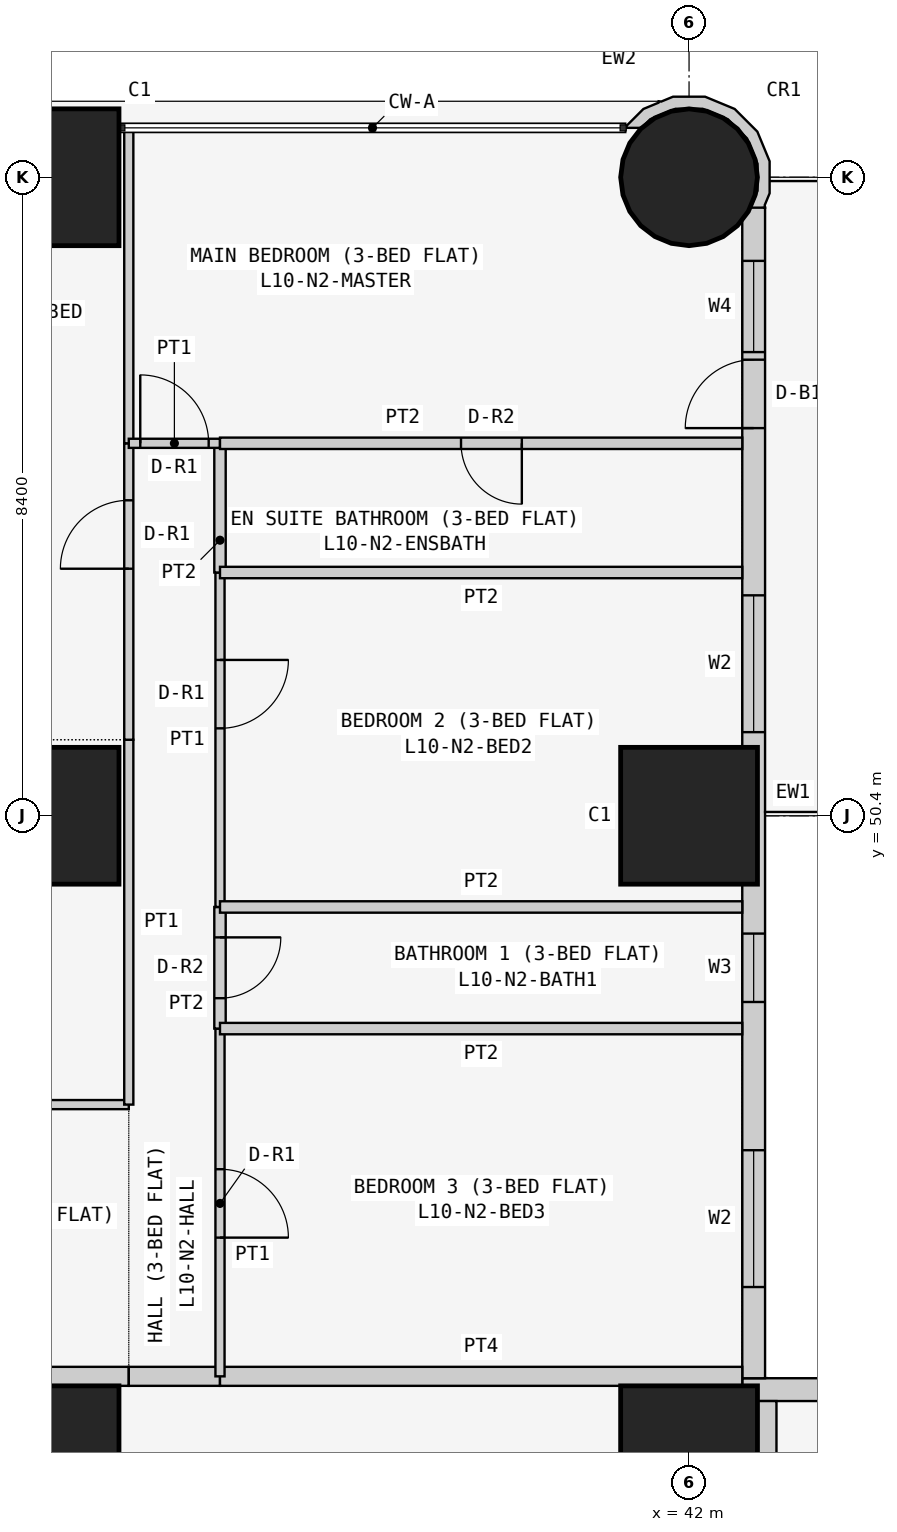
"""IFC4 building model, lengths in metres.
Left out: names, types, materials, properties, quantities, classifications, styles, units other than length and angle.
Written with IfcOpenShell. Run it as: python <this file> out.ifc"""

import sys

from ifc_helpers import new_model, si_unit, direction, frame, frame_2d, origin, origin_2d, place, context, subcontext, project, spatial, polyline, rectangle, circle, outline, extrude, element, fill, save


model = new_model("IFC4")
c1 = context("Model", 3, precision=1e-05, world=origin(), true_north=direction((0.0, 1.0)))
c2 = subcontext(c1, "Body", "Model", "MODEL_VIEW")
j1 = project(units=[si_unit("LENGTHUNIT", "METRE"), si_unit("PLANEANGLEUNIT", "RADIAN")], contexts=[c1])
p1 = place(None, origin())
s1 = spatial("IfcSite", under=j1, at=p1, CompositionType="ELEMENT")
p2 = place(p1, origin())
s2 = spatial("IfcBuilding", under=s1, at=p2, CompositionType="ELEMENT")
p3 = place(p2, frame((0.0, 0.0, 45.3)))
s3 = spatial("IfcBuildingStorey", under=s2, at=p3, CompositionType="ELEMENT", Elevation=45.3)
for number, where, z_axis, x_axis in (
    (1, (33.6, 42.0, 0.0), (0.0, 0.0, 1.0), (1.0, 0.0, 0.0)),
    (2, (33.6, 50.4, 0.0), (0.0, 0.0, 1.0), (1.0, 0.0, 0.0)),
    (3, (33.6, 58.8, 0.0), (0.0, 0.0, 1.0), (1.0, 0.0, 0.0)),
    (4, (42.0, 42.0, 0.0), (0.0, 0.0, 1.0), (1.0, 0.0, 0.0)),
    (5, (42.0, 50.4, 0.0), (0.0, 0.0, 1.0), (1.0, 0.0, 0.0)),
):
    element("IfcColumn", number, at=place(p3, frame(where, z_axis=z_axis, x_axis=x_axis)), inside=s3, PredefinedType="COLUMN", context=c2, shape_type="SweptSolid", body=[
        extrude(rectangle(XDim=1.8, YDim=1.8, at=origin_2d()), origin(), (0.0, 0.0, 1.0), 3.6),
    ])
p4 = place(p3, frame((42.0, 58.8, 0.0), z_axis=(0.0, 0.0, 1.0), x_axis=(1.0, 0.0, 0.0)))
e6 = element("IfcColumn", 6, at=p4, inside=s3, PredefinedType="COLUMN", context=c2, shape_type="SweptSolid", body=[
    extrude(circle(Radius=0.9, at=origin_2d()), origin(), (0.0, 0.0, 1.0), 3.6),
])
p5 = place(p3, frame((58.4, 42.85, 0.0), z_axis=(0.0, 0.0, 1.0), x_axis=(-1.0, 0.0, 0.0)))
e7 = element("IfcWall", 7, at=p5, inside=s3, PredefinedType="SOLIDWALL", context=c2, shape_type="SweptSolid", body=[
    extrude(rectangle(XDim=15.7, YDim=0.3, at=frame_2d((7.85, 0.0))), origin(), (0.0, 0.0, 1.0), 3.45),
])
p6 = place(p5, frame((12.4, 0.0, 0.9)))
e8 = element("IfcOpeningElement", 8, at=p6, cuts=e7, PredefinedType="OPENING", context=c2, shape_type="SweptSolid", body=[
    extrude(rectangle(XDim=1.8, YDim=1.5, at=frame_2d((0.9, 0.75))), frame((0.0, 0.16, 0.0), z_axis=(0.0, -1.0, 0.0), x_axis=(1.0, 0.0, 0.0)), (0.0, 0.0, 1.0), 0.32),
])
p7 = place(p5, frame((9.55, 0.0, 1.5)))
e9 = element("IfcOpeningElement", 9, at=p7, cuts=e7, PredefinedType="OPENING", context=c2, shape_type="SweptSolid", body=[
    extrude(rectangle(XDim=0.9, YDim=0.7, at=frame_2d((0.45, 0.35))), frame((0.0, 0.16, 0.0), z_axis=(0.0, -1.0, 0.0), x_axis=(1.0, 0.0, 0.0)), (0.0, 0.0, 1.0), 0.32),
])
p8 = place(p5, frame((5.1, 0.0, 0.9)))
e10 = element("IfcOpeningElement", 10, at=p8, cuts=e7, PredefinedType="OPENING", context=c2, shape_type="SweptSolid", body=[
    extrude(rectangle(XDim=1.8, YDim=1.5, at=frame_2d((0.9, 0.75))), frame((0.0, 0.16, 0.0), z_axis=(0.0, -1.0, 0.0), x_axis=(1.0, 0.0, 0.0)), (0.0, 0.0, 1.0), 0.32),
])
p9 = place(p5, frame((2.0, 0.0, 0.0)))
e11 = element("IfcOpeningElement", 11, at=p9, cuts=e7, PredefinedType="OPENING", context=c2, shape_type="SweptSolid", body=[
    extrude(rectangle(XDim=0.9, YDim=2.4, at=frame_2d((0.45, 1.2))), frame((0.0, 0.16, 0.0), z_axis=(0.0, -1.0, 0.0), x_axis=(1.0, 0.0, 0.0)), (0.0, 0.0, 1.0), 0.32),
])
p10 = place(p5, frame((0.7, 0.0, 0.9)))
e12 = element("IfcOpeningElement", 12, at=p10, cuts=e7, PredefinedType="OPENING", context=c2, shape_type="SweptSolid", body=[
    extrude(rectangle(XDim=1.2, YDim=1.5, at=frame_2d((0.6, 0.75))), frame((0.0, 0.16, 0.0), z_axis=(0.0, -1.0, 0.0), x_axis=(1.0, 0.0, 0.0)), (0.0, 0.0, 1.0), 0.32),
])
p11 = place(p3, frame((42.85, 43.0, 0.0), z_axis=(0.0, 0.0, 1.0), x_axis=(0.0, 1.0, 0.0)))
e13 = element("IfcWall", 13, at=p11, inside=s3, PredefinedType="SOLIDWALL", context=c2, shape_type="SweptSolid", body=[
    extrude(rectangle(XDim=15.4, YDim=0.3, at=frame_2d((7.7, 0.0))), origin(), (0.0, 0.0, 1.0), 3.45),
])
p12 = place(p11, frame((1.2, 0.0, 0.9)))
e14 = element("IfcOpeningElement", 14, at=p12, cuts=e13, PredefinedType="OPENING", context=c2, shape_type="SweptSolid", body=[
    extrude(rectangle(XDim=1.8, YDim=1.5, at=frame_2d((0.9, 0.75))), frame((0.0, 0.16, 0.0), z_axis=(0.0, -1.0, 0.0), x_axis=(1.0, 0.0, 0.0)), (0.0, 0.0, 1.0), 0.32),
])
p13 = place(p11, frame((4.95, 0.0, 1.5)))
e15 = element("IfcOpeningElement", 15, at=p13, cuts=e13, PredefinedType="OPENING", context=c2, shape_type="SweptSolid", body=[
    extrude(rectangle(XDim=0.9, YDim=0.7, at=frame_2d((0.45, 0.35))), frame((0.0, 0.16, 0.0), z_axis=(0.0, -1.0, 0.0), x_axis=(1.0, 0.0, 0.0)), (0.0, 0.0, 1.0), 0.32),
])
p14 = place(p11, frame((8.5, 0.0, 0.9)))
e16 = element("IfcOpeningElement", 16, at=p14, cuts=e13, PredefinedType="OPENING", context=c2, shape_type="SweptSolid", body=[
    extrude(rectangle(XDim=1.8, YDim=1.5, at=frame_2d((0.9, 0.75))), frame((0.0, 0.16, 0.0), z_axis=(0.0, -1.0, 0.0), x_axis=(1.0, 0.0, 0.0)), (0.0, 0.0, 1.0), 0.32),
])
p15 = place(p11, frame((12.5, 0.0, 0.0)))
e17 = element("IfcOpeningElement", 17, at=p15, cuts=e13, PredefinedType="OPENING", context=c2, shape_type="SweptSolid", body=[
    extrude(rectangle(XDim=0.9, YDim=2.4, at=frame_2d((0.45, 1.2))), frame((0.0, 0.16, 0.0), z_axis=(0.0, -1.0, 0.0), x_axis=(1.0, 0.0, 0.0)), (0.0, 0.0, 1.0), 0.32),
])
p16 = place(p11, frame((13.5, 0.0, 0.9)))
e18 = element("IfcOpeningElement", 18, at=p16, cuts=e13, PredefinedType="OPENING", context=c2, shape_type="SweptSolid", body=[
    extrude(rectangle(XDim=1.2, YDim=1.5, at=frame_2d((0.6, 0.75))), frame((0.0, 0.16, 0.0), z_axis=(0.0, -1.0, 0.0), x_axis=(1.0, 0.0, 0.0)), (0.0, 0.0, 1.0), 0.32),
])
p17 = place(p3, frame((42.91, 58.436, 0.0), z_axis=(0.0, 0.0, 1.0), x_axis=(0.377204953059, 0.926129809145, 0.0)))
e19 = element("IfcWall", 19, at=p17, inside=s3, PredefinedType="SOLIDWALL", context=c2, shape_type="SweptSolid", body=[
    extrude(outline(polyline([(0.769, 1.728), (0.75, 1.723), (0.6, 1.875), (0.295, 2.004), (0.281, 1.998), (0.36, 1.803), (0.509, 1.741), (0.761, 1.486), (0.896, 1.154), (0.894, 0.795), (0.755, 0.465), (0.5, 0.213), (0.168, 0.078), (-0.1, 0.08), (0.001, -0.097), (0.03, -0.08), (0.198, -0.081), (0.589, 0.078), (0.889, 0.374), (1.052, 0.763), (1.055, 1.185), (0.896, 1.575), (0.778, 1.695), (0.769, 1.728)])), origin(), (0.0, 0.0, 1.0), 3.45),
])
p18 = place(p3, frame((29.4, 43.025, 0.0), z_axis=(0.0, 0.0, 1.0), x_axis=(1.0, 0.0, 0.0)))
e20 = element("IfcWall", 20, at=p18, inside=s3, PredefinedType="PARTITIONING", context=c2, shape_type="SweptSolid", body=[
    extrude(rectangle(XDim=5.229, YDim=0.25, at=frame_2d((2.615, 0.0))), origin(), (0.0, 0.0, 1.0), 3.45),
])
p19 = place(p18, frame((2.1, 0.0, 0.0)))
e21 = element("IfcOpeningElement", 21, at=p19, cuts=e20, PredefinedType="OPENING", context=c2, shape_type="SweptSolid", body=[
    extrude(rectangle(XDim=1.0, YDim=2.1, at=frame_2d((0.5, 1.05))), frame((0.0, 0.135, 0.0), z_axis=(0.0, -1.0, 0.0), x_axis=(1.0, 0.0, 0.0)), (0.0, 0.0, 1.0), 0.27),
])
p20 = place(p3, frame((34.629, 43.025, 0.0), z_axis=(0.0, 0.0, 1.0), x_axis=(1.0, 0.0, 0.0)))
e22 = element("IfcWall", 22, at=p20, inside=s3, PredefinedType="PARTITIONING", context=c2, shape_type="SweptSolid", body=[
    extrude(rectangle(XDim=1.2, YDim=0.25, at=frame_2d((0.6, 0.0))), origin(), (0.0, 0.0, 1.0), 3.45),
])
for number, where, z_axis, x_axis in (
    (23, (35.829, 43.025, 0.0), (0.0, 0.0, 1.0), (1.0, 0.0, 0.0)),
    (24, (43.025, 42.7, 0.0), (0.0, 0.0, 1.0), (0.0, -1.0, 0.0)),
):
    element("IfcWall", number, at=place(p3, frame(where, z_axis=z_axis, x_axis=x_axis)), inside=s3, PredefinedType="PARTITIONING", context=c2, shape_type="SweptSolid", body=[
        extrude(rectangle(XDim=6.871, YDim=0.25, at=frame_2d((3.436, 0.0))), origin(), (0.0, 0.0, 1.0), 3.45),
    ])
p21 = place(p3, frame((29.4, 46.6, 0.0), z_axis=(0.0, 0.0, 1.0), x_axis=(1.0, 0.0, 0.0)))
e25 = element("IfcWall", 25, at=p21, inside=s3, PredefinedType="PARTITIONING", context=c2, shape_type="SweptSolid", body=[
    extrude(rectangle(XDim=5.229, YDim=0.12, at=frame_2d((2.615, 0.0))), origin(), (0.0, 0.0, 1.0), 3.45),
])
p22 = place(p21, frame((1.05, 0.0, 0.0)))
e26 = element("IfcOpeningElement", 26, at=p22, cuts=e25, PredefinedType="OPENING", context=c2, shape_type="SweptSolid", body=[
    extrude(rectangle(XDim=0.9, YDim=2.1, at=frame_2d((0.45, 1.05))), frame((0.0, 0.07, 0.0), z_axis=(0.0, -1.0, 0.0), x_axis=(1.0, 0.0, 0.0)), (0.0, 0.0, 1.0), 0.14),
])
p23 = place(p3, frame((34.629, 51.4, 0.0), z_axis=(0.0, 0.0, 1.0), x_axis=(0.0, -1.0, 0.0)))
e27 = element("IfcWall", 27, at=p23, inside=s3, PredefinedType="PARTITIONING", context=c2, shape_type="SweptSolid", body=[
    extrude(rectangle(XDim=4.8, YDim=0.12, at=frame_2d((2.4, 0.0))), origin(), (0.0, 0.0, 1.0), 3.45),
])
p24 = place(p3, frame((34.629, 55.3, 0.0), z_axis=(0.0, 0.0, 1.0), x_axis=(0.0, -1.0, 0.0)))
e28 = element("IfcWall", 28, at=p24, inside=s3, PredefinedType="PARTITIONING", context=c2, shape_type="SweptSolid", body=[
    extrude(rectangle(XDim=3.9, YDim=0.12, at=frame_2d((1.95, 0.0))), origin(), (0.0, 0.0, 1.0), 3.45),
])
p25 = place(p24, frame((0.75, 0.0, 0.0)))
e29 = element("IfcOpeningElement", 29, at=p25, cuts=e28, PredefinedType="OPENING", context=c2, shape_type="SweptSolid", body=[
    extrude(rectangle(XDim=0.9, YDim=2.1, at=frame_2d((0.45, 1.05))), frame((0.0, 0.07, 0.0), z_axis=(0.0, -1.0, 0.0), x_axis=(1.0, 0.0, 0.0)), (0.0, 0.0, 1.0), 0.14),
])
p26 = place(p3, frame((34.629, 59.45, 0.0), z_axis=(0.0, 0.0, 1.0), x_axis=(0.0, -1.0, 0.0)))
e30 = element("IfcWall", 30, at=p26, inside=s3, PredefinedType="PARTITIONING", context=c2, shape_type="SweptSolid", body=[
    extrude(rectangle(XDim=4.15, YDim=0.12, at=frame_2d((2.075, 0.0))), origin(), (0.0, 0.0, 1.0), 3.45),
])
p27 = place(p3, frame((35.829, 47.6, 0.0), z_axis=(0.0, 0.0, 1.0), x_axis=(0.0, -1.0, 0.0)))
e31 = element("IfcWall", 31, at=p27, inside=s3, PredefinedType="PARTITIONING", context=c2, shape_type="SweptSolid", body=[
    extrude(rectangle(XDim=4.575, YDim=0.12, at=frame_2d((2.288, 0.0))), origin(), (0.0, 0.0, 1.0), 3.45),
])
p28 = place(p27, frame((1.85, 0.0, 0.0)))
e32 = element("IfcOpeningElement", 32, at=p28, cuts=e31, PredefinedType="OPENING", context=c2, shape_type="SweptSolid", body=[
    extrude(rectangle(XDim=0.9, YDim=2.1, at=frame_2d((0.45, 1.05))), frame((0.0, 0.07, 0.0), z_axis=(0.0, -1.0, 0.0), x_axis=(1.0, 0.0, 0.0)), (0.0, 0.0, 1.0), 0.14),
])
p29 = place(p3, frame((35.829, 49.2, 0.0), z_axis=(0.0, 0.0, 1.0), x_axis=(0.0, -1.0, 0.0)))
e33 = element("IfcWall", 33, at=p29, inside=s3, PredefinedType="PARTITIONING", context=c2, shape_type="SweptSolid", body=[
    extrude(rectangle(XDim=1.6, YDim=0.15, at=frame_2d((0.8, 0.0))), origin(), (0.0, 0.0, 1.0), 3.45),
])
p30 = place(p29, frame((0.4, 0.0, 0.0)))
e34 = element("IfcOpeningElement", 34, at=p30, cuts=e33, PredefinedType="OPENING", context=c2, shape_type="SweptSolid", body=[
    extrude(rectangle(XDim=0.8, YDim=2.1, at=frame_2d((0.4, 1.05))), frame((0.0, 0.085, 0.0), z_axis=(0.0, -1.0, 0.0), x_axis=(1.0, 0.0, 0.0)), (0.0, 0.0, 1.0), 0.17),
])
p31 = place(p3, frame((35.829, 53.6, 0.0), z_axis=(0.0, 0.0, 1.0), x_axis=(0.0, -1.0, 0.0)))
e35 = element("IfcWall", 35, at=p31, inside=s3, PredefinedType="PARTITIONING", context=c2, shape_type="SweptSolid", body=[
    extrude(rectangle(XDim=4.4, YDim=0.12, at=frame_2d((2.2, 0.0))), origin(), (0.0, 0.0, 1.0), 3.45),
])
p32 = place(p31, frame((1.15, 0.0, 0.0)))
e36 = element("IfcOpeningElement", 36, at=p32, cuts=e35, PredefinedType="OPENING", context=c2, shape_type="SweptSolid", body=[
    extrude(rectangle(XDim=0.9, YDim=2.1, at=frame_2d((0.45, 1.05))), frame((0.0, 0.07, 0.0), z_axis=(0.0, -1.0, 0.0), x_axis=(1.0, 0.0, 0.0)), (0.0, 0.0, 1.0), 0.14),
])
p33 = place(p3, frame((35.829, 55.3, 0.0), z_axis=(0.0, 0.0, 1.0), x_axis=(0.0, -1.0, 0.0)))
e37 = element("IfcWall", 37, at=p33, inside=s3, PredefinedType="PARTITIONING", context=c2, shape_type="SweptSolid", body=[
    extrude(rectangle(XDim=1.7, YDim=0.15, at=frame_2d((0.85, 0.0))), origin(), (0.0, 0.0, 1.0), 3.45),
])
p34 = place(p3, frame((34.629, 55.3, 0.0), z_axis=(0.0, 0.0, 1.0), x_axis=(1.0, 0.0, 0.0)))
e38 = element("IfcWall", 38, at=p34, inside=s3, PredefinedType="PARTITIONING", context=c2, shape_type="SweptSolid", body=[
    extrude(rectangle(XDim=1.2, YDim=0.12, at=frame_2d((0.6, 0.0))), origin(), (0.0, 0.0, 1.0), 3.45),
])
p35 = place(p34, frame((0.151, 0.0, 0.0)))
e39 = element("IfcOpeningElement", 39, at=p35, cuts=e38, PredefinedType="OPENING", context=c2, shape_type="SweptSolid", body=[
    extrude(rectangle(XDim=0.9, YDim=2.1, at=frame_2d((0.45, 1.05))), frame((0.0, 0.07, 0.0), z_axis=(0.0, -1.0, 0.0), x_axis=(1.0, 0.0, 0.0)), (0.0, 0.0, 1.0), 0.14),
])
for number, where, z_axis, x_axis in (
    (40, (35.829, 47.6, 0.0), (0.0, 0.0, 1.0), (1.0, 0.0, 0.0)),
    (41, (35.829, 49.2, 0.0), (0.0, 0.0, 1.0), (1.0, 0.0, 0.0)),
    (42, (35.829, 53.6, 0.0), (0.0, 0.0, 1.0), (1.0, 0.0, 0.0)),
):
    element("IfcWall", number, at=place(p3, frame(where, z_axis=z_axis, x_axis=x_axis)), inside=s3, PredefinedType="PARTITIONING", context=c2, shape_type="SweptSolid", body=[
        extrude(rectangle(XDim=6.871, YDim=0.15, at=frame_2d((3.436, 0.0))), origin(), (0.0, 0.0, 1.0), 3.45),
    ])
p36 = place(p3, frame((35.829, 55.3, 0.0), z_axis=(0.0, 0.0, 1.0), x_axis=(1.0, 0.0, 0.0)))
e43 = element("IfcWall", 43, at=p36, inside=s3, PredefinedType="PARTITIONING", context=c2, shape_type="SweptSolid", body=[
    extrude(rectangle(XDim=6.871, YDim=0.15, at=frame_2d((3.436, 0.0))), origin(), (0.0, 0.0, 1.0), 3.45),
])
p37 = place(p36, frame((3.171, 0.0, 0.0)))
e44 = element("IfcOpeningElement", 44, at=p37, cuts=e43, PredefinedType="OPENING", context=c2, shape_type="SweptSolid", body=[
    extrude(rectangle(XDim=0.8, YDim=2.1, at=frame_2d((0.4, 1.05))), frame((0.0, 0.085, 0.0), z_axis=(0.0, -1.0, 0.0), x_axis=(1.0, 0.0, 0.0)), (0.0, 0.0, 1.0), 0.17),
])
p38 = place(p12, origin())
e45 = element("IfcWindow", 45, at=p38, inside=s3, PartitioningType="SINGLE_PANEL", PredefinedType="WINDOW", context=c2, shape_type="SweptSolid", body=[
    extrude(rectangle(XDim=1.8, YDim=1.5, at=frame_2d((0.9, 0.75))), frame((0.0, 0.03, 0.0), z_axis=(0.0, -1.0, 0.0), x_axis=(1.0, 0.0, 0.0)), (0.0, 0.0, 1.0), 0.06),
])
fill(e14, e45)
p39 = place(p13, origin())
e46 = element("IfcWindow", 46, at=p39, inside=s3, PartitioningType="SINGLE_PANEL", PredefinedType="WINDOW", context=c2, shape_type="SweptSolid", body=[
    extrude(rectangle(XDim=0.9, YDim=0.7, at=frame_2d((0.45, 0.35))), frame((0.0, 0.03, 0.0), z_axis=(0.0, -1.0, 0.0), x_axis=(1.0, 0.0, 0.0)), (0.0, 0.0, 1.0), 0.06),
])
fill(e15, e46)
p40 = place(p14, origin())
e47 = element("IfcWindow", 47, at=p40, inside=s3, PartitioningType="SINGLE_PANEL", PredefinedType="WINDOW", context=c2, shape_type="SweptSolid", body=[
    extrude(rectangle(XDim=1.8, YDim=1.5, at=frame_2d((0.9, 0.75))), frame((0.0, 0.03, 0.0), z_axis=(0.0, -1.0, 0.0), x_axis=(1.0, 0.0, 0.0)), (0.0, 0.0, 1.0), 0.06),
])
fill(e16, e47)
p41 = place(p15, origin())
e48 = element("IfcDoor", 48, at=p41, inside=s3, OperationType="SINGLE_SWING_LEFT", PredefinedType="DOOR", context=c2, shape_type="SweptSolid", body=[
    extrude(rectangle(XDim=0.9, YDim=2.4, at=frame_2d((0.45, 1.2))), frame((0.0, 0.025, 0.0), z_axis=(0.0, -1.0, 0.0), x_axis=(1.0, 0.0, 0.0)), (0.0, 0.0, 1.0), 0.05),
])
fill(e17, e48)
p42 = place(p16, origin())
e49 = element("IfcWindow", 49, at=p42, inside=s3, PartitioningType="SINGLE_PANEL", PredefinedType="WINDOW", context=c2, shape_type="SweptSolid", body=[
    extrude(rectangle(XDim=1.2, YDim=1.5, at=frame_2d((0.6, 0.75))), frame((0.0, 0.03, 0.0), z_axis=(0.0, -1.0, 0.0), x_axis=(1.0, 0.0, 0.0)), (0.0, 0.0, 1.0), 0.06),
])
fill(e18, e49)
p43 = place(p25, frame((0.9, 0.0, 0.0), z_axis=(0.0, 0.0, 1.0), x_axis=(-1.0, 0.0, 0.0)))
e50 = element("IfcDoor", 50, at=p43, inside=s3, OperationType="SINGLE_SWING_LEFT", PredefinedType="DOOR", context=c2, shape_type="SweptSolid", body=[
    extrude(rectangle(XDim=0.9, YDim=2.1, at=frame_2d((0.45, 1.05))), frame((0.0, 0.025, 0.0), z_axis=(0.0, -1.0, 0.0), x_axis=(1.0, 0.0, 0.0)), (0.0, 0.0, 1.0), 0.05),
])
fill(e29, e50)
p44 = place(p28, origin())
e51 = element("IfcDoor", 51, at=p44, inside=s3, OperationType="SINGLE_SWING_RIGHT", PredefinedType="DOOR", context=c2, shape_type="SweptSolid", body=[
    extrude(rectangle(XDim=0.9, YDim=2.1, at=frame_2d((0.45, 1.05))), frame((0.0, 0.025, 0.0), z_axis=(0.0, -1.0, 0.0), x_axis=(1.0, 0.0, 0.0)), (0.0, 0.0, 1.0), 0.05),
])
fill(e32, e51)
p45 = place(p30, origin())
e52 = element("IfcDoor", 52, at=p45, inside=s3, OperationType="SINGLE_SWING_LEFT", PredefinedType="DOOR", context=c2, shape_type="SweptSolid", body=[
    extrude(rectangle(XDim=0.8, YDim=2.1, at=frame_2d((0.4, 1.05))), frame((0.0, 0.025, 0.0), z_axis=(0.0, -1.0, 0.0), x_axis=(1.0, 0.0, 0.0)), (0.0, 0.0, 1.0), 0.05),
])
fill(e34, e52)
p46 = place(p32, origin())
e53 = element("IfcDoor", 53, at=p46, inside=s3, OperationType="SINGLE_SWING_LEFT", PredefinedType="DOOR", context=c2, shape_type="SweptSolid", body=[
    extrude(rectangle(XDim=0.9, YDim=2.1, at=frame_2d((0.45, 1.05))), frame((0.0, 0.025, 0.0), z_axis=(0.0, -1.0, 0.0), x_axis=(1.0, 0.0, 0.0)), (0.0, 0.0, 1.0), 0.05),
])
fill(e36, e53)
p47 = place(p35, origin())
e54 = element("IfcDoor", 54, at=p47, inside=s3, OperationType="SINGLE_SWING_LEFT", PredefinedType="DOOR", context=c2, shape_type="SweptSolid", body=[
    extrude(rectangle(XDim=0.9, YDim=2.1, at=frame_2d((0.45, 1.05))), frame((0.0, 0.025, 0.0), z_axis=(0.0, -1.0, 0.0), x_axis=(1.0, 0.0, 0.0)), (0.0, 0.0, 1.0), 0.05),
])
fill(e39, e54)
p48 = place(p37, frame((0.8, 0.0, 0.0), z_axis=(0.0, 0.0, 1.0), x_axis=(-1.0, 0.0, 0.0)))
e55 = element("IfcDoor", 55, at=p48, inside=s3, OperationType="SINGLE_SWING_LEFT", PredefinedType="DOOR", context=c2, shape_type="SweptSolid", body=[
    extrude(rectangle(XDim=0.8, YDim=2.1, at=frame_2d((0.4, 1.05))), frame((0.0, 0.025, 0.0), z_axis=(0.0, -1.0, 0.0), x_axis=(1.0, 0.0, 0.0)), (0.0, 0.0, 1.0), 0.05),
])
fill(e44, e55)
save(model, sys.argv[1])
